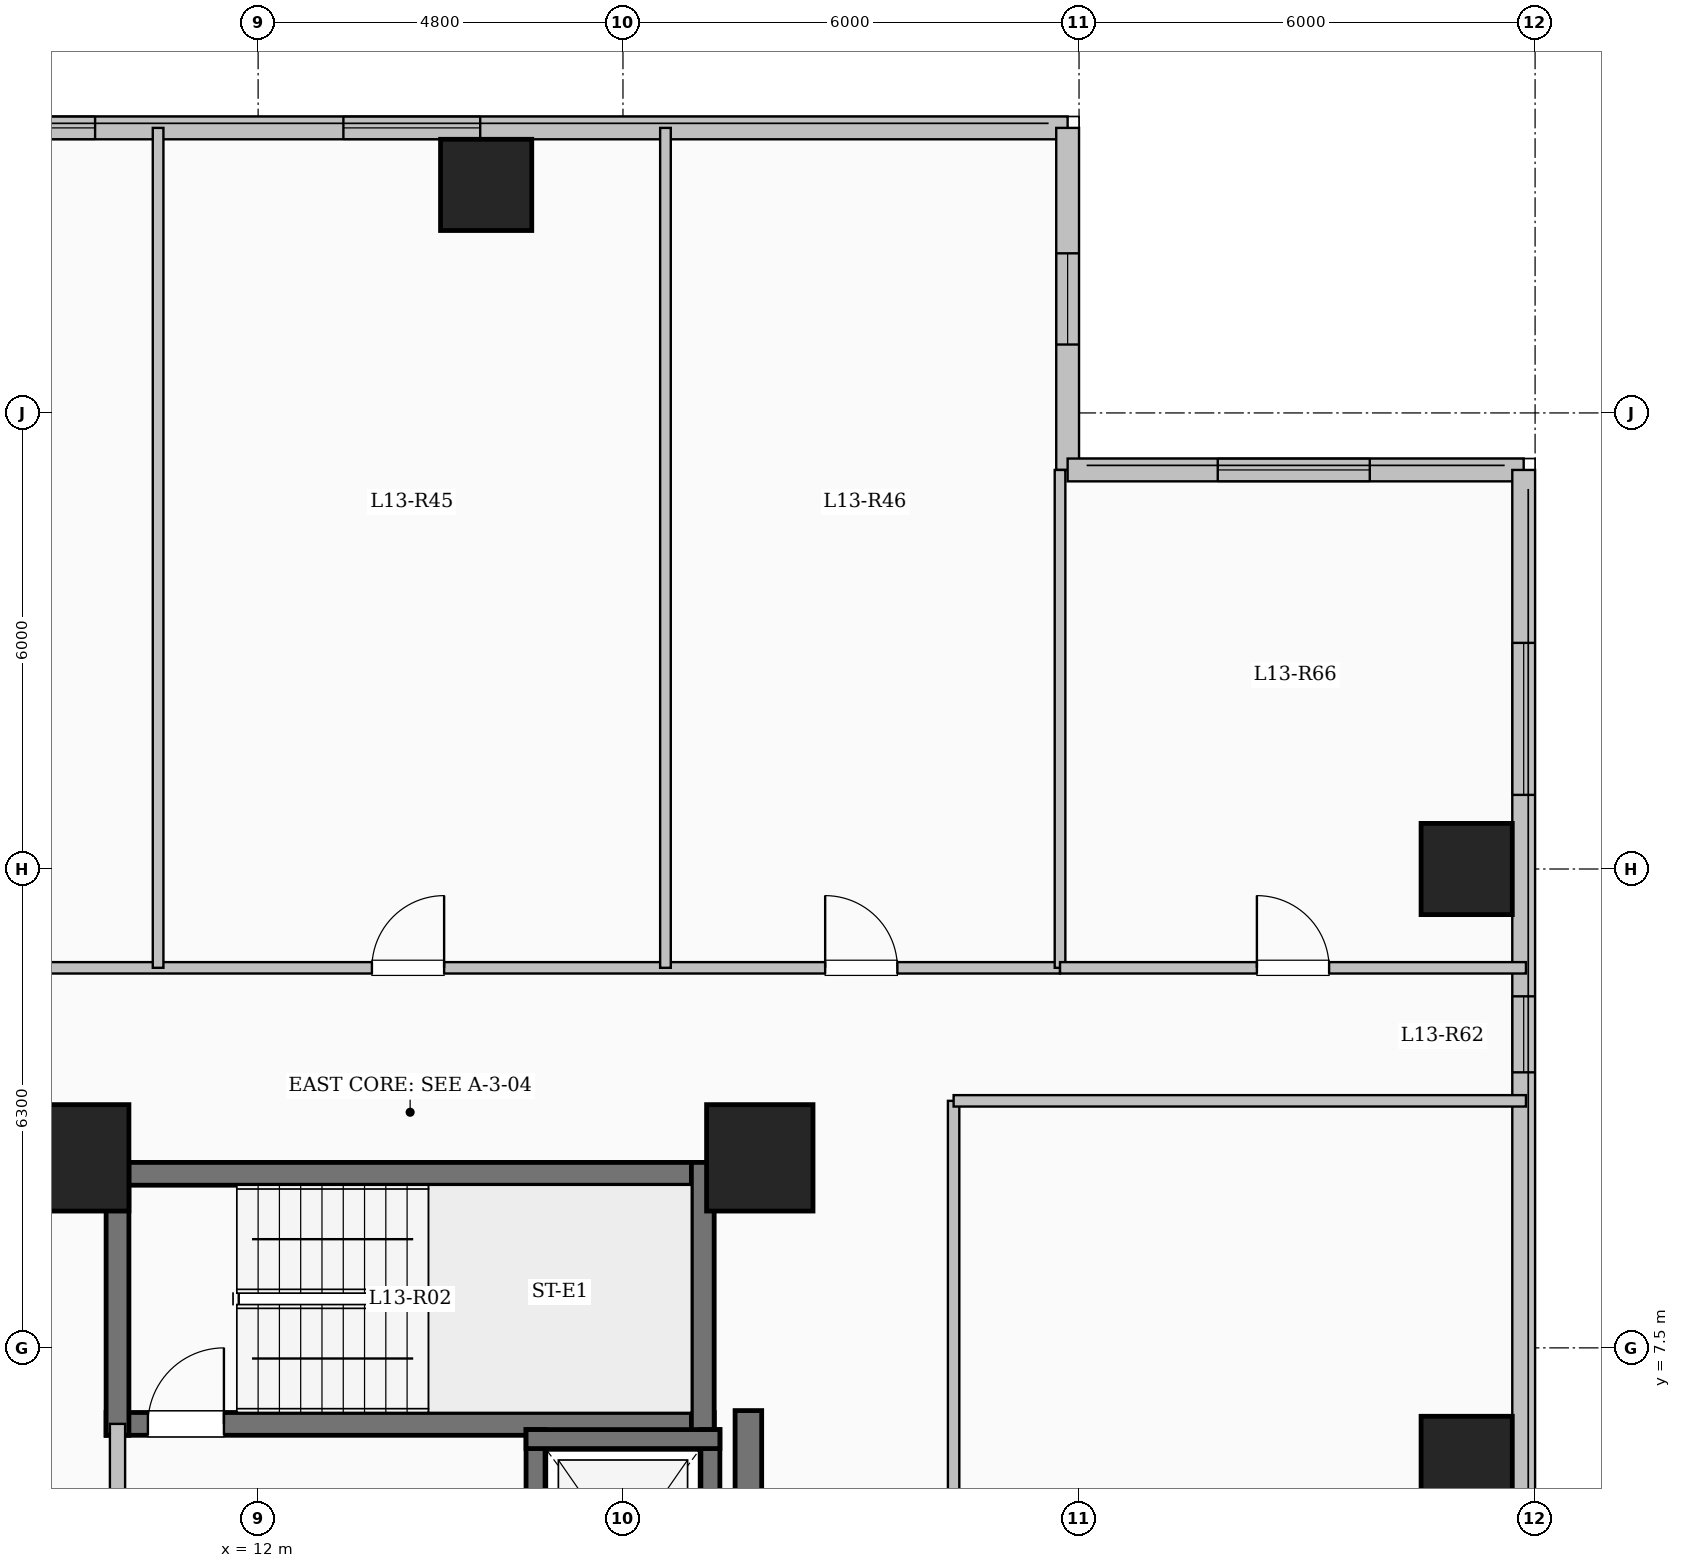
"""IFC4 building model, lengths in metres.
Left out: names, types, materials, properties, quantities, classifications, styles, units other than length and angle.
Written with IfcOpenShell. Run it as: python <this file> out.ifc"""

import sys

from ifc_helpers import new_model, si_unit, direction, frame, frame_2d, origin, origin_2d, place, context, subcontext, project, spatial, rectangle, extrude, element, fill, save


model = new_model("IFC4")
c1 = context("Model", 3, precision=1e-05, world=origin(), true_north=direction((0.0, 1.0)))
c2 = subcontext(c1, "Body", "Model", "MODEL_VIEW")
j1 = project(units=[si_unit("LENGTHUNIT", "METRE"), si_unit("PLANEANGLEUNIT", "RADIAN")], contexts=[c1])
p1 = place(None, origin())
s1 = spatial("IfcSite", under=j1, at=p1, CompositionType="ELEMENT")
p2 = place(p1, origin())
s2 = spatial("IfcBuilding", under=s1, at=p2, CompositionType="ELEMENT")
p3 = place(p2, frame((0.0, 0.0, 50.8)))
s3 = spatial("IfcBuildingStorey", under=s2, at=p3, CompositionType="ELEMENT", Elevation=50.8)
for number, where, z_axis, x_axis in (
    (1, (9.6, 10.0, 0.0), (0.0, 0.0, 1.0), (1.0, 0.0, 0.0)),
    (2, (18.6, 10.0, 0.0), (0.0, 0.0, 1.0), (1.0, 0.0, 0.0)),
):
    element("IfcColumn", number, at=place(p3, frame(where, z_axis=z_axis, x_axis=x_axis)), inside=s3, PredefinedType="COLUMN", context=c2, shape_type="SweptSolid", body=[
        extrude(rectangle(XDim=1.4, YDim=1.4, at=origin_2d()), origin(), (0.0, 0.0, 1.0), 3.35),
    ])
for number, where, z_axis, x_axis in (
    (3, (15.0, 22.8, 0.0), (0.0, 0.0, 1.0), (1.0, 0.0, 0.0)),
    (4, (27.9, 6.0, 0.0), (0.0, 0.0, 1.0), (1.0, 0.0, 0.0)),
    (5, (27.9, 13.8, 0.0), (0.0, 0.0, 1.0), (1.0, 0.0, 0.0)),
):
    element("IfcColumn", number, at=place(p3, frame(where, z_axis=z_axis, x_axis=x_axis)), inside=s3, PredefinedType="COLUMN", context=c2, shape_type="SweptSolid", body=[
        extrude(rectangle(XDim=1.2, YDim=1.2, at=origin_2d()), origin(), (0.0, 0.0, 1.0), 3.35),
    ])
p4 = place(p3, frame((7.35, 23.55, 0.0), z_axis=(0.0, 0.0, 1.0), x_axis=(1.0, 0.0, 0.0)))
e6 = element("IfcWall", 6, at=p4, inside=s3, PredefinedType="SOLIDWALL", context=c2, shape_type="SweptSolid", body=[
    extrude(rectangle(XDim=15.3, YDim=0.3, at=frame_2d((7.65, 0.0))), origin(), (0.0, 0.0, 1.0), 3.1),
])
p5 = place(p4, frame((0.705, 0.0, 0.9)))
e7 = element("IfcOpeningElement", 7, at=p5, cuts=e6, PredefinedType="OPENING", context=c2, shape_type="SweptSolid", body=[
    extrude(rectangle(XDim=1.8, YDim=1.65, at=frame_2d((0.9, 0.825))), frame((0.0, 0.16, 0.0), z_axis=(0.0, -1.0, 0.0), x_axis=(1.0, 0.0, 0.0)), (0.0, 0.0, 1.0), 0.32),
])
p6 = place(p4, frame((5.772, 0.0, 0.9)))
e8 = element("IfcOpeningElement", 8, at=p6, cuts=e6, PredefinedType="OPENING", context=c2, shape_type="SweptSolid", body=[
    extrude(rectangle(XDim=1.8, YDim=1.65, at=frame_2d((0.9, 0.825))), frame((0.0, 0.16, 0.0), z_axis=(0.0, -1.0, 0.0), x_axis=(1.0, 0.0, 0.0)), (0.0, 0.0, 1.0), 0.32),
])
p7 = place(p3, frame((22.65, 23.55, 0.0), z_axis=(0.0, 0.0, 1.0), x_axis=(0.0, -1.0, 0.0)))
e9 = element("IfcWall", 9, at=p7, inside=s3, PredefinedType="SOLIDWALL", context=c2, shape_type="SweptSolid", body=[
    extrude(rectangle(XDim=4.5, YDim=0.3, at=frame_2d((2.25, 0.0))), origin(), (0.0, 0.0, 1.0), 3.1),
])
p8 = place(p7, frame((1.65, 0.0, 0.95)))
e10 = element("IfcOpeningElement", 10, at=p8, cuts=e9, PredefinedType="OPENING", context=c2, shape_type="SweptSolid", body=[
    extrude(rectangle(XDim=1.2, YDim=1.5, at=frame_2d((0.6, 0.75))), frame((0.0, 0.16, 0.0), z_axis=(0.0, -1.0, 0.0), x_axis=(1.0, 0.0, 0.0)), (0.0, 0.0, 1.0), 0.32),
])
p9 = place(p3, frame((22.65, 19.05, 0.0), z_axis=(0.0, 0.0, 1.0), x_axis=(1.0, 0.0, 0.0)))
e11 = element("IfcWall", 11, at=p9, inside=s3, PredefinedType="SOLIDWALL", context=c2, shape_type="SweptSolid", body=[
    extrude(rectangle(XDim=6.0, YDim=0.3, at=frame_2d((3.0, 0.0))), origin(), (0.0, 0.0, 1.0), 3.1),
])
p10 = place(p9, frame((1.975, 0.0, 0.9)))
e12 = element("IfcOpeningElement", 12, at=p10, cuts=e11, PredefinedType="OPENING", context=c2, shape_type="SweptSolid", body=[
    extrude(rectangle(XDim=2.0, YDim=1.7, at=frame_2d((1.0, 0.85))), frame((0.0, 0.16, 0.0), z_axis=(0.0, -1.0, 0.0), x_axis=(1.0, 0.0, 0.0)), (0.0, 0.0, 1.0), 0.32),
])
p11 = place(p3, frame((28.65, 19.05, 0.0), z_axis=(0.0, 0.0, 1.0), x_axis=(0.0, -1.0, 0.0)))
e13 = element("IfcWall", 13, at=p11, inside=s3, PredefinedType="SOLIDWALL", context=c2, shape_type="SweptSolid", body=[
    extrude(rectangle(XDim=38.1, YDim=0.3, at=frame_2d((19.05, 0.0))), origin(), (0.0, 0.0, 1.0), 3.1),
])
p12 = place(p11, frame((2.275, 0.0, 0.9)))
e14 = element("IfcOpeningElement", 14, at=p12, cuts=e13, PredefinedType="OPENING", context=c2, shape_type="SweptSolid", body=[
    extrude(rectangle(XDim=2.0, YDim=1.7, at=frame_2d((1.0, 0.85))), frame((0.0, 0.16, 0.0), z_axis=(0.0, -1.0, 0.0), x_axis=(1.0, 0.0, 0.0)), (0.0, 0.0, 1.0), 0.32),
])
p13 = place(p11, frame((6.925, 0.0, 0.95)))
e15 = element("IfcOpeningElement", 15, at=p13, cuts=e13, PredefinedType="OPENING", context=c2, shape_type="SweptSolid", body=[
    extrude(rectangle(XDim=1.0, YDim=1.5, at=frame_2d((0.5, 0.75))), frame((0.0, 0.16, 0.0), z_axis=(0.0, -1.0, 0.0), x_axis=(1.0, 0.0, 0.0)), (0.0, 0.0, 1.0), 0.32),
])
p14 = place(p11, frame((16.3, 0.0, 0.9)))
e16 = element("IfcOpeningElement", 16, at=p14, cuts=e13, PredefinedType="OPENING", context=c2, shape_type="SweptSolid", body=[
    extrude(rectangle(XDim=2.0, YDim=1.7, at=frame_2d((1.0, 0.85))), frame((0.0, 0.16, 0.0), z_axis=(0.0, -1.0, 0.0), x_axis=(1.0, 0.0, 0.0)), (0.0, 0.0, 1.0), 0.32),
])
p15 = place(p11, frame((27.058, 0.0, 0.9)))
e17 = element("IfcOpeningElement", 17, at=p15, cuts=e13, PredefinedType="OPENING", context=c2, shape_type="SweptSolid", body=[
    extrude(rectangle(XDim=1.5, YDim=1.65, at=frame_2d((0.75, 0.825))), frame((0.0, 0.16, 0.0), z_axis=(0.0, -1.0, 0.0), x_axis=(1.0, 0.0, 0.0)), (0.0, 0.0, 1.0), 0.32),
])
p16 = place(p11, frame((32.55, 0.0, 0.9)))
e18 = element("IfcOpeningElement", 18, at=p16, cuts=e13, PredefinedType="OPENING", context=c2, shape_type="SweptSolid", body=[
    extrude(rectangle(XDim=2.4, YDim=1.8, at=frame_2d((1.2, 0.9))), frame((0.0, 0.16, 0.0), z_axis=(0.0, -1.0, 0.0), x_axis=(1.0, 0.0, 0.0)), (0.0, 0.0, 1.0), 0.32),
])
p17 = place(p3, frame((10.0, 9.79, 0.0), z_axis=(0.0, 0.0, 1.0), x_axis=(1.0, 0.0, 0.0)))
e19 = element("IfcWall", 19, at=p17, inside=s3, PredefinedType="SHEAR", context=c2, shape_type="SweptSolid", body=[
    extrude(rectangle(XDim=8.0, YDim=0.3, at=frame_2d((4.0, 0.0))), origin(), (0.0, 0.0, 1.0), 3.35),
])
p18 = place(p3, frame((10.0, 6.5, 0.0), z_axis=(0.0, 0.0, 1.0), x_axis=(1.0, 0.0, 0.0)))
e20 = element("IfcWall", 20, at=p18, inside=s3, PredefinedType="SHEAR", context=c2, shape_type="SweptSolid", body=[
    extrude(rectangle(XDim=8.0, YDim=0.3, at=frame_2d((4.0, 0.0))), origin(), (0.0, 0.0, 1.0), 3.35),
])
p19 = place(p18, frame((0.55, 0.0, 0.0)))
e21 = element("IfcOpeningElement", 21, at=p19, cuts=e20, PredefinedType="OPENING", context=c2, shape_type="SweptSolid", body=[
    extrude(rectangle(XDim=1.0, YDim=2.15, at=frame_2d((0.5, 1.075))), frame((0.0, 0.16, 0.0), z_axis=(0.0, -1.0, 0.0), x_axis=(1.0, 0.0, 0.0)), (0.0, 0.0, 1.0), 0.32),
])
for number, where, z_axis, x_axis in (
    (22, (10.15, 6.35, 0.0), (0.0, 0.0, 1.0), (0.0, 1.0, 0.0)),
    (23, (17.85, 6.35, 0.0), (0.0, 0.0, 1.0), (0.0, 1.0, 0.0)),
):
    element("IfcWall", number, at=place(p3, frame(where, z_axis=z_axis, x_axis=x_axis)), inside=s3, PredefinedType="SHEAR", context=c2, shape_type="SweptSolid", body=[
        extrude(rectangle(XDim=3.59, YDim=0.3, at=frame_2d((1.795, 0.0))), origin(), (0.0, 0.0, 1.0), 3.35),
    ])
p20 = place(p3, frame((10.15, 3.25, 0.0), z_axis=(0.0, 0.0, 1.0), x_axis=(0.0, 1.0, 0.0)))
e24 = element("IfcWall", 24, at=p20, inside=s3, PredefinedType="SOLIDWALL", context=c2, shape_type="SweptSolid", body=[
    extrude(rectangle(XDim=3.25, YDim=0.2, at=frame_2d((1.625, 0.0))), origin(), (0.0, 0.0, 1.0), 3.1),
])
p21 = place(p20, frame((1.1, 0.0, 0.0)))
e25 = element("IfcOpeningElement", 25, at=p21, cuts=e24, PredefinedType="OPENING", context=c2, shape_type="SweptSolid", body=[
    extrude(rectangle(XDim=1.02, YDim=2.15, at=frame_2d((0.51, 1.075))), frame((0.0, 0.11, 0.0), z_axis=(0.0, -1.0, 0.0), x_axis=(1.0, 0.0, 0.0)), (0.0, 0.0, 1.0), 0.22),
])
p22 = place(p3, frame((15.65, 3.175, 0.0), z_axis=(0.0, 0.0, 1.0), x_axis=(0.0, 1.0, 0.0)))
e26 = element("IfcWall", 26, at=p22, inside=s3, PredefinedType="SHEAR", context=c2, shape_type="SweptSolid", body=[
    extrude(rectangle(XDim=3.25, YDim=0.25, at=frame_2d((1.625, 0.0))), origin(), (0.0, 0.0, 1.0), 3.35),
])
p23 = place(p22, frame((1.075, 0.0, 0.0)))
e27 = element("IfcOpeningElement", 27, at=p23, cuts=e26, PredefinedType="OPENING", context=c2, shape_type="SweptSolid", body=[
    extrude(rectangle(XDim=1.1, YDim=2.15, at=frame_2d((0.55, 1.075))), frame((0.0, 0.135, 0.0), z_axis=(0.0, -1.0, 0.0), x_axis=(1.0, 0.0, 0.0)), (0.0, 0.0, 1.0), 0.27),
])
p24 = place(p3, frame((17.95, 3.175, 0.0), z_axis=(0.0, 0.0, 1.0), x_axis=(0.0, 1.0, 0.0)))
e28 = element("IfcWall", 28, at=p24, inside=s3, PredefinedType="SHEAR", context=c2, shape_type="SweptSolid", body=[
    extrude(rectangle(XDim=3.25, YDim=0.25, at=frame_2d((1.625, 0.0))), origin(), (0.0, 0.0, 1.0), 3.35),
])
p25 = place(p3, frame((15.525, 6.3, 0.0), z_axis=(0.0, 0.0, 1.0), x_axis=(1.0, 0.0, 0.0)))
e29 = element("IfcWall", 29, at=p25, inside=s3, PredefinedType="SHEAR", context=c2, shape_type="SweptSolid", body=[
    extrude(rectangle(XDim=2.55, YDim=0.25, at=frame_2d((1.275, 0.0))), origin(), (0.0, 0.0, 1.0), 3.35),
])
p26 = place(p3, frame((18.45, -7.375, 0.0), z_axis=(0.0, 0.0, 1.0), x_axis=(0.0, 1.0, 0.0)))
e30 = element("IfcWall", 30, at=p26, inside=s3, PredefinedType="SHEAR", context=c2, shape_type="SweptSolid", body=[
    extrude(rectangle(XDim=14.05, YDim=0.35, at=frame_2d((7.025, 0.0))), origin(), (0.0, 0.0, 1.0), 3.35),
])
p27 = place(p3, frame((3.85, 12.5, 0.0), z_axis=(0.0, 0.0, 1.0), x_axis=(1.0, 0.0, 0.0)))
e31 = element("IfcWall", 31, at=p27, inside=s3, PredefinedType="PARTITIONING", context=c2, shape_type="SweptSolid", body=[
    extrude(rectangle(XDim=18.7, YDim=0.15, at=frame_2d((9.35, 0.0))), origin(), (0.0, 0.0, 1.0), 3.1),
])
p28 = place(p27, frame((2.942, 0.0, 0.0)))
e32 = element("IfcOpeningElement", 32, at=p28, cuts=e31, PredefinedType="OPENING", context=c2, shape_type="SweptSolid", body=[
    extrude(rectangle(XDim=0.95, YDim=2.15, at=frame_2d((0.475, 1.075))), frame((0.0, 0.085, 0.0), z_axis=(0.0, -1.0, 0.0), x_axis=(1.0, 0.0, 0.0)), (0.0, 0.0, 1.0), 0.17),
])
p29 = place(p27, frame((9.647, 0.0, 0.0)))
e33 = element("IfcOpeningElement", 33, at=p29, cuts=e31, PredefinedType="OPENING", context=c2, shape_type="SweptSolid", body=[
    extrude(rectangle(XDim=0.95, YDim=2.15, at=frame_2d((0.475, 1.075))), frame((0.0, 0.085, 0.0), z_axis=(0.0, -1.0, 0.0), x_axis=(1.0, 0.0, 0.0)), (0.0, 0.0, 1.0), 0.17),
])
p30 = place(p27, frame((15.61, 0.0, 0.0)))
e34 = element("IfcOpeningElement", 34, at=p30, cuts=e31, PredefinedType="OPENING", context=c2, shape_type="SweptSolid", body=[
    extrude(rectangle(XDim=0.95, YDim=2.15, at=frame_2d((0.475, 1.075))), frame((0.0, 0.085, 0.0), z_axis=(0.0, -1.0, 0.0), x_axis=(1.0, 0.0, 0.0)), (0.0, 0.0, 1.0), 0.17),
])
p31 = place(p3, frame((21.15, -7.25, 0.0), z_axis=(0.0, 0.0, 1.0), x_axis=(0.0, 1.0, 0.0)))
e35 = element("IfcWall", 35, at=p31, inside=s3, PredefinedType="PARTITIONING", context=c2, shape_type="SweptSolid", body=[
    extrude(rectangle(XDim=18.0, YDim=0.15, at=frame_2d((9.0, 0.0))), origin(), (0.0, 0.0, 1.0), 2.585),
])
for number, where, z_axis, x_axis in (
    (36, (10.684, 12.5, 0.0), (0.0, 0.0, 1.0), (0.0, 1.0, 0.0)),
    (37, (17.359, 12.5, 0.0), (0.0, 0.0, 1.0), (0.0, 1.0, 0.0)),
):
    element("IfcWall", number, at=place(p3, frame(where, z_axis=z_axis, x_axis=x_axis)), inside=s3, PredefinedType="PARTITIONING", context=c2, shape_type="SweptSolid", body=[
        extrude(rectangle(XDim=11.05, YDim=0.14, at=frame_2d((5.525, 0.0))), origin(), (0.0, 0.0, 1.0), 3.1),
    ])
p32 = place(p3, frame((21.15, 10.75, 0.0), z_axis=(0.0, 0.0, 1.0), x_axis=(1.0, 0.0, 0.0)))
e38 = element("IfcWall", 38, at=p32, inside=s3, PredefinedType="PARTITIONING", context=c2, shape_type="SweptSolid", body=[
    extrude(rectangle(XDim=7.53, YDim=0.15, at=frame_2d((3.765, 0.0))), origin(), (0.0, 0.0, 1.0), 3.1),
])
p33 = place(p3, frame((22.55, 12.5, 0.0), z_axis=(0.0, 0.0, 1.0), x_axis=(0.0, 1.0, 0.0)))
e39 = element("IfcWall", 39, at=p33, inside=s3, PredefinedType="PARTITIONING", context=c2, shape_type="SweptSolid", body=[
    extrude(rectangle(XDim=6.55, YDim=0.14, at=frame_2d((3.275, 0.0))), origin(), (0.0, 0.0, 1.0), 3.1),
])
p34 = place(p3, frame((22.55, 12.5, 0.0), z_axis=(0.0, 0.0, 1.0), x_axis=(1.0, 0.0, 0.0)))
e40 = element("IfcWall", 40, at=p34, inside=s3, PredefinedType="PARTITIONING", context=c2, shape_type="SweptSolid", body=[
    extrude(rectangle(XDim=6.13, YDim=0.15, at=frame_2d((3.065, 0.0))), origin(), (0.0, 0.0, 1.0), 3.1),
])
p35 = place(p34, frame((2.59, 0.0, 0.0)))
e41 = element("IfcOpeningElement", 41, at=p35, cuts=e40, PredefinedType="OPENING", context=c2, shape_type="SweptSolid", body=[
    extrude(rectangle(XDim=0.95, YDim=2.15, at=frame_2d((0.475, 1.075))), frame((0.0, 0.085, 0.0), z_axis=(0.0, -1.0, 0.0), x_axis=(1.0, 0.0, 0.0)), (0.0, 0.0, 1.0), 0.17),
])
p36 = place(p5, origin())
e42 = element("IfcWindow", 42, at=p36, inside=s3, PartitioningType="SINGLE_PANEL", PredefinedType="WINDOW", context=c2, shape_type="SweptSolid", body=[
    extrude(rectangle(XDim=1.8, YDim=1.65, at=frame_2d((0.9, 0.825))), frame((0.0, 0.03, 0.0), z_axis=(0.0, -1.0, 0.0), x_axis=(1.0, 0.0, 0.0)), (0.0, 0.0, 1.0), 0.06),
])
fill(e7, e42)
p37 = place(p6, origin())
e43 = element("IfcWindow", 43, at=p37, inside=s3, PartitioningType="SINGLE_PANEL", PredefinedType="WINDOW", context=c2, shape_type="SweptSolid", body=[
    extrude(rectangle(XDim=1.8, YDim=1.65, at=frame_2d((0.9, 0.825))), frame((0.0, 0.03, 0.0), z_axis=(0.0, -1.0, 0.0), x_axis=(1.0, 0.0, 0.0)), (0.0, 0.0, 1.0), 0.06),
])
fill(e8, e43)
p38 = place(p8, origin())
e44 = element("IfcWindow", 44, at=p38, inside=s3, PartitioningType="SINGLE_PANEL", PredefinedType="WINDOW", context=c2, shape_type="SweptSolid", body=[
    extrude(rectangle(XDim=1.2, YDim=1.5, at=frame_2d((0.6, 0.75))), frame((0.0, 0.03, 0.0), z_axis=(0.0, -1.0, 0.0), x_axis=(1.0, 0.0, 0.0)), (0.0, 0.0, 1.0), 0.06),
])
fill(e10, e44)
p39 = place(p10, origin())
e45 = element("IfcWindow", 45, at=p39, inside=s3, PartitioningType="SINGLE_PANEL", PredefinedType="WINDOW", context=c2, shape_type="SweptSolid", body=[
    extrude(rectangle(XDim=2.0, YDim=1.7, at=frame_2d((1.0, 0.85))), frame((0.0, 0.03, 0.0), z_axis=(0.0, -1.0, 0.0), x_axis=(1.0, 0.0, 0.0)), (0.0, 0.0, 1.0), 0.06),
])
fill(e12, e45)
p40 = place(p12, origin())
e46 = element("IfcWindow", 46, at=p40, inside=s3, PartitioningType="SINGLE_PANEL", PredefinedType="WINDOW", context=c2, shape_type="SweptSolid", body=[
    extrude(rectangle(XDim=2.0, YDim=1.7, at=frame_2d((1.0, 0.85))), frame((0.0, 0.03, 0.0), z_axis=(0.0, -1.0, 0.0), x_axis=(1.0, 0.0, 0.0)), (0.0, 0.0, 1.0), 0.06),
])
fill(e14, e46)
p41 = place(p13, origin())
e47 = element("IfcWindow", 47, at=p41, inside=s3, PartitioningType="SINGLE_PANEL", PredefinedType="WINDOW", context=c2, shape_type="SweptSolid", body=[
    extrude(rectangle(XDim=1.0, YDim=1.5, at=frame_2d((0.5, 0.75))), frame((0.0, 0.03, 0.0), z_axis=(0.0, -1.0, 0.0), x_axis=(1.0, 0.0, 0.0)), (0.0, 0.0, 1.0), 0.06),
])
fill(e15, e47)
p42 = place(p19, origin())
e48 = element("IfcDoor", 48, at=p42, inside=s3, OperationType="SINGLE_SWING_RIGHT", PredefinedType="DOOR", context=c2, shape_type="SweptSolid", body=[
    extrude(rectangle(XDim=1.0, YDim=2.15, at=frame_2d((0.5, 1.075))), frame((0.0, 0.025, 0.0), z_axis=(0.0, -1.0, 0.0), x_axis=(1.0, 0.0, 0.0)), (0.0, 0.0, 1.0), 0.05),
])
fill(e21, e48)
p43 = place(p29, origin())
e49 = element("IfcDoor", 49, at=p43, inside=s3, OperationType="SINGLE_SWING_RIGHT", PredefinedType="DOOR", context=c2, shape_type="SweptSolid", body=[
    extrude(rectangle(XDim=0.95, YDim=2.15, at=frame_2d((0.475, 1.075))), frame((0.0, 0.025, 0.0), z_axis=(0.0, -1.0, 0.0), x_axis=(1.0, 0.0, 0.0)), (0.0, 0.0, 1.0), 0.05),
])
fill(e33, e49)
p44 = place(p30, origin())
e50 = element("IfcDoor", 50, at=p44, inside=s3, OperationType="SINGLE_SWING_LEFT", PredefinedType="DOOR", context=c2, shape_type="SweptSolid", body=[
    extrude(rectangle(XDim=0.95, YDim=2.15, at=frame_2d((0.475, 1.075))), frame((0.0, 0.025, 0.0), z_axis=(0.0, -1.0, 0.0), x_axis=(1.0, 0.0, 0.0)), (0.0, 0.0, 1.0), 0.05),
])
fill(e34, e50)
p45 = place(p35, origin())
e51 = element("IfcDoor", 51, at=p45, inside=s3, OperationType="SINGLE_SWING_LEFT", PredefinedType="DOOR", context=c2, shape_type="SweptSolid", body=[
    extrude(rectangle(XDim=0.95, YDim=2.15, at=frame_2d((0.475, 1.075))), frame((0.0, 0.025, 0.0), z_axis=(0.0, -1.0, 0.0), x_axis=(1.0, 0.0, 0.0)), (0.0, 0.0, 1.0), 0.05),
])
fill(e41, e51)
save(model, sys.argv[1])
